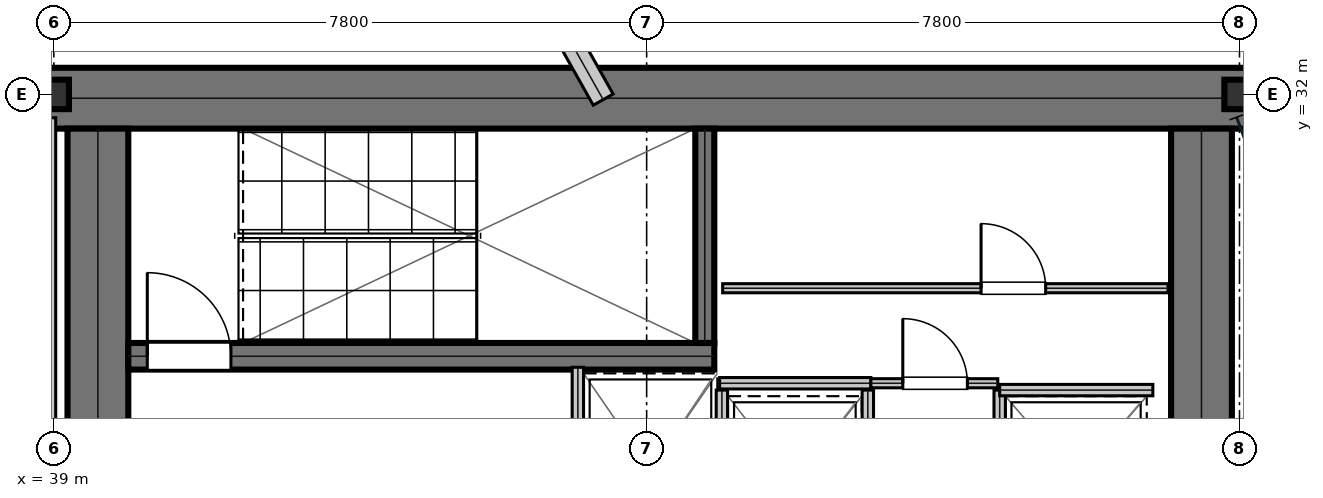
"""IFC4 building model, lengths in metres.
Left out: names, types, materials, properties, quantities, classifications, styles, units other than length and angle.
Written with IfcOpenShell. Run it as: python <this file> out.ifc"""

import sys

from ifc_helpers import new_model, si_unit, direction, frame, frame_2d, origin, origin_2d, place, context, subcontext, project, spatial, rectangle, i_section, extrude, element, fill, save


model = new_model("IFC4")
c1 = context("Model", 3, precision=1e-05, world=origin(), true_north=direction((0.0, 1.0)))
c2 = subcontext(c1, "Body", "Model", "MODEL_VIEW")
j1 = project(units=[si_unit("LENGTHUNIT", "METRE"), si_unit("PLANEANGLEUNIT", "RADIAN")], contexts=[c1])
p1 = place(None, origin())
s1 = spatial("IfcSite", under=j1, at=p1, CompositionType="ELEMENT")
p2 = place(p1, origin())
s2 = spatial("IfcBuilding", under=s1, at=p2, CompositionType="ELEMENT")
p3 = place(p2, frame((0.0, 0.0, 165.45)))
s3 = spatial("IfcBuildingStorey", under=s2, at=p3, CompositionType="ELEMENT", Elevation=165.45)
p4 = place(p3, frame((38.8, 31.95, 0.0), z_axis=(0.0, 0.0, 1.0), x_axis=(1.0, 0.0, 0.0)))
e1 = element("IfcWall", 1, at=p4, inside=s3, PredefinedType="SHEAR", context=c2, shape_type="SweptSolid", body=[
    extrude(rectangle(XDim=16.0, YDim=0.8, at=frame_2d((8.0, 0.0))), origin(), (0.0, 0.0, 1.0), 3.81),
])
p5 = place(p3, frame((39.58, 25.4, 0.0), z_axis=(0.0, 0.0, 1.0), x_axis=(0.0, 1.0, 0.0)))
e2 = element("IfcWall", 2, at=p5, inside=s3, PredefinedType="SHEAR", context=c2, shape_type="SweptSolid", body=[
    extrude(rectangle(XDim=6.15, YDim=0.8, at=frame_2d((3.075, 0.0))), origin(), (0.0, 0.0, 1.0), 3.81),
])
p6 = place(p3, frame((54.1, 16.45, 0.0), z_axis=(0.0, 0.0, 1.0), x_axis=(0.0, 1.0, 0.0)))
e3 = element("IfcWall", 3, at=p6, inside=s3, PredefinedType="SHEAR", context=c2, shape_type="SweptSolid", body=[
    extrude(rectangle(XDim=15.1, YDim=0.8, at=frame_2d((7.55, 0.0))), origin(), (0.0, 0.0, 1.0), 3.81),
])
p7 = place(p3, frame((39.98, 28.555, 0.0), z_axis=(0.0, 0.0, 1.0), x_axis=(1.0, 0.0, 0.0)))
e4 = element("IfcWall", 4, at=p7, inside=s3, PredefinedType="SHEAR", context=c2, shape_type="SweptSolid", body=[
    extrude(rectangle(XDim=7.71, YDim=0.35, at=frame_2d((3.855, 0.0))), origin(), (0.0, 0.0, 1.0), 3.81),
])
p8 = place(p7, frame((0.25, 0.0, 0.0)))
e5 = element("IfcOpeningElement", 5, at=p8, cuts=e4, PredefinedType="OPENING", context=c2, shape_type="SweptSolid", body=[
    extrude(rectangle(XDim=1.1, YDim=2.15, at=frame_2d((0.55, 1.075))), frame((0.0, 0.185, 0.0), z_axis=(0.0, -1.0, 0.0), x_axis=(1.0, 0.0, 0.0)), (0.0, 0.0, 1.0), 0.37),
])
p9 = place(p3, frame((47.565, 28.73, 0.0), z_axis=(0.0, 0.0, 1.0), x_axis=(0.0, 1.0, 0.0)))
e6 = element("IfcWall", 6, at=p9, inside=s3, PredefinedType="SHEAR", context=c2, shape_type="SweptSolid", body=[
    extrude(rectangle(XDim=2.82, YDim=0.25, at=frame_2d((1.41, 0.0))), origin(), (0.0, 0.0, 1.0), 3.81),
])
for number, where, z_axis, x_axis in (
    (7, (39.0, 32.0, 0.0), (0.0, 0.0, 1.0), (1.0, 0.0, 0.0)),
    (8, (54.6, 32.0, 0.0), (0.0, 0.0, 1.0), (1.0, 0.0, 0.0)),
):
    element("IfcColumn", number, at=place(p3, frame(where, z_axis=z_axis, x_axis=x_axis)), inside=s3, PredefinedType="COLUMN", context=c2, shape_type="SweptSolid", body=[
        extrude(i_section(OverallWidth=0.398, OverallDepth=0.387, WebThickness=0.021, FlangeThickness=0.033, at=origin_2d()), origin(), (0.0, 0.0, 1.0), 4.044),
    ])
p10 = place(p3, frame((46.228, 31.931, 0.0), z_axis=(0.0, 0.0, 1.0), x_axis=(-0.490139068903, 0.871644246889, 0.0)))
e9 = element("IfcWall", 9, at=p10, inside=s3, PredefinedType="STANDARD", context=c2, shape_type="SweptSolid", body=[
    extrude(rectangle(XDim=6.073, YDim=0.3, at=frame_2d((3.036, 0.0))), origin(), (0.0, 0.0, 1.0), 3.338),
])
p11 = place(p3, frame((45.895, 25.69, 0.0), z_axis=(0.0, 0.0, 1.0), x_axis=(0.0, 1.0, 0.0)))
e10 = element("IfcWall", 10, at=p11, inside=s3, PredefinedType="PARTITIONING", context=c2, shape_type="SweptSolid", body=[
    extrude(rectangle(XDim=2.72, YDim=0.15, at=frame_2d((1.36, 0.0))), origin(), (0.0, 0.0, 1.0), 3.81),
])
p12 = place(p11, frame((0.81, 0.0, 0.0)))
e11 = element("IfcOpeningElement", 11, at=p12, cuts=e10, PredefinedType="OPENING", context=c2, shape_type="SweptSolid", body=[
    extrude(rectangle(XDim=1.1, YDim=2.15, at=frame_2d((0.55, 1.075))), frame((0.0, 0.085, 0.0), z_axis=(0.0, -1.0, 0.0), x_axis=(1.0, 0.0, 0.0)), (0.0, 0.0, 1.0), 0.17),
])
for number, where, z_axis, x_axis in (
    (12, (47.79, 25.695, 0.0), (0.0, 0.0, 1.0), (0.0, 1.0, 0.0)),
    (13, (49.71, 25.695, 0.0), (0.0, 0.0, 1.0), (0.0, 1.0, 0.0)),
):
    element("IfcWall", number, at=place(p3, frame(where, z_axis=z_axis, x_axis=x_axis)), inside=s3, PredefinedType="PARTITIONING", context=c2, shape_type="SweptSolid", body=[
        extrude(rectangle(XDim=2.415, YDim=0.15, at=frame_2d((1.208, 0.0))), origin(), (0.0, 0.0, 1.0), 3.81),
    ])
p13 = place(p3, frame((51.445, 25.79, 0.0), z_axis=(0.0, 0.0, 1.0), x_axis=(0.0, 1.0, 0.0)))
e14 = element("IfcWall", 14, at=p13, inside=s3, PredefinedType="PARTITIONING", context=c2, shape_type="SweptSolid", body=[
    extrude(rectangle(XDim=2.32, YDim=0.15, at=frame_2d((1.16, 0.0))), origin(), (0.0, 0.0, 1.0), 3.81),
])
p14 = place(p13, frame((0.61, 0.0, 0.0)))
e15 = element("IfcOpeningElement", 15, at=p14, cuts=e14, PredefinedType="OPENING", context=c2, shape_type="SweptSolid", body=[
    extrude(rectangle(XDim=1.1, YDim=2.15, at=frame_2d((0.55, 1.075))), frame((0.0, 0.085, 0.0), z_axis=(0.0, -1.0, 0.0), x_axis=(1.0, 0.0, 0.0)), (0.0, 0.0, 1.0), 0.17),
])
p15 = place(p3, frame((51.445, 28.11, 0.0), z_axis=(0.0, 0.0, 1.0), x_axis=(1.0, 0.0, 0.0)))
e16 = element("IfcWall", 16, at=p15, inside=s3, PredefinedType="PARTITIONING", context=c2, shape_type="SweptSolid", body=[
    extrude(rectangle(XDim=2.015, YDim=0.15, at=frame_2d((1.007, 0.0))), origin(), (0.0, 0.0, 1.0), 3.81),
])
p16 = place(p3, frame((47.76, 28.2, 0.0), z_axis=(0.0, 0.0, 1.0), x_axis=(1.0, 0.0, 0.0)))
e17 = element("IfcWall", 17, at=p16, inside=s3, PredefinedType="PARTITIONING", context=c2, shape_type="SweptSolid", body=[
    extrude(rectangle(XDim=1.99, YDim=0.15, at=frame_2d((0.995, 0.0))), origin(), (0.0, 0.0, 1.0), 3.81),
])
p17 = place(p3, frame((49.75, 28.2, 0.0), z_axis=(0.0, 0.0, 1.0), x_axis=(1.0, 0.0, 0.0)))
e18 = element("IfcWall", 18, at=p17, inside=s3, PredefinedType="PARTITIONING", context=c2, shape_type="SweptSolid", body=[
    extrude(rectangle(XDim=1.67, YDim=0.12, at=frame_2d((0.835, 0.0))), origin(), (0.0, 0.0, 1.0), 3.81),
])
p18 = place(p17, frame((0.42, 0.0, 0.0)))
e19 = element("IfcOpeningElement", 19, at=p18, cuts=e18, PredefinedType="OPENING", context=c2, shape_type="SweptSolid", body=[
    extrude(rectangle(XDim=0.85, YDim=2.15, at=frame_2d((0.425, 1.075))), frame((0.0, 0.07, 0.0), z_axis=(0.0, -1.0, 0.0), x_axis=(1.0, 0.0, 0.0)), (0.0, 0.0, 1.0), 0.14),
])
p19 = place(p3, frame((47.8, 29.45, 0.0), z_axis=(0.0, 0.0, 1.0), x_axis=(1.0, 0.0, 0.0)))
e20 = element("IfcWall", 20, at=p19, inside=s3, PredefinedType="PARTITIONING", context=c2, shape_type="SweptSolid", body=[
    extrude(rectangle(XDim=5.86, YDim=0.12, at=frame_2d((2.93, 0.0))), origin(), (0.0, 0.0, 1.0), 3.81),
])
p20 = place(p19, frame((3.4, 0.0, 0.0)))
e21 = element("IfcOpeningElement", 21, at=p20, cuts=e20, PredefinedType="OPENING", context=c2, shape_type="SweptSolid", body=[
    extrude(rectangle(XDim=0.85, YDim=2.15, at=frame_2d((0.425, 1.075))), frame((0.0, 0.07, 0.0), z_axis=(0.0, -1.0, 0.0), x_axis=(1.0, 0.0, 0.0)), (0.0, 0.0, 1.0), 0.14),
])
p21 = place(p3, frame((38.95, 25.3, 0.0), z_axis=(0.0, 0.0, 1.0), x_axis=(0.0, 1.0, 0.0)))
e22 = element("IfcWall", 22, at=p21, inside=s3, PredefinedType="PARTITIONING", context=c2, shape_type="SweptSolid", body=[
    extrude(rectangle(XDim=6.393, YDim=0.15, at=frame_2d((3.197, 0.0))), origin(), (0.0, 0.0, 1.0), 3.443),
])
p22 = place(p18, origin())
e23 = element("IfcDoor", 23, at=p22, inside=s3, OperationType="SINGLE_SWING_LEFT", PredefinedType="DOOR", context=c2, shape_type="SweptSolid", body=[
    extrude(rectangle(XDim=0.85, YDim=2.15, at=frame_2d((0.425, 1.075))), frame((0.0, 0.025, 0.0), z_axis=(0.0, -1.0, 0.0), x_axis=(1.0, 0.0, 0.0)), (0.0, 0.0, 1.0), 0.05),
])
fill(e19, e23)
p23 = place(p20, origin())
e24 = element("IfcDoor", 24, at=p23, inside=s3, OperationType="SINGLE_SWING_LEFT", PredefinedType="DOOR", context=c2, shape_type="SweptSolid", body=[
    extrude(rectangle(XDim=0.85, YDim=2.15, at=frame_2d((0.425, 1.075))), frame((0.0, 0.025, 0.0), z_axis=(0.0, -1.0, 0.0), x_axis=(1.0, 0.0, 0.0)), (0.0, 0.0, 1.0), 0.05),
])
fill(e21, e24)
p24 = place(p8, origin())
e25 = element("IfcDoor", 25, at=p24, inside=s3, OperationType="SINGLE_SWING_LEFT", PredefinedType="DOOR", context=c2, shape_type="SweptSolid", body=[
    extrude(rectangle(XDim=1.1, YDim=2.15, at=frame_2d((0.55, 1.075))), frame((0.0, 0.025, 0.0), z_axis=(0.0, -1.0, 0.0), x_axis=(1.0, 0.0, 0.0)), (0.0, 0.0, 1.0), 0.05),
])
fill(e5, e25)
save(model, sys.argv[1])
